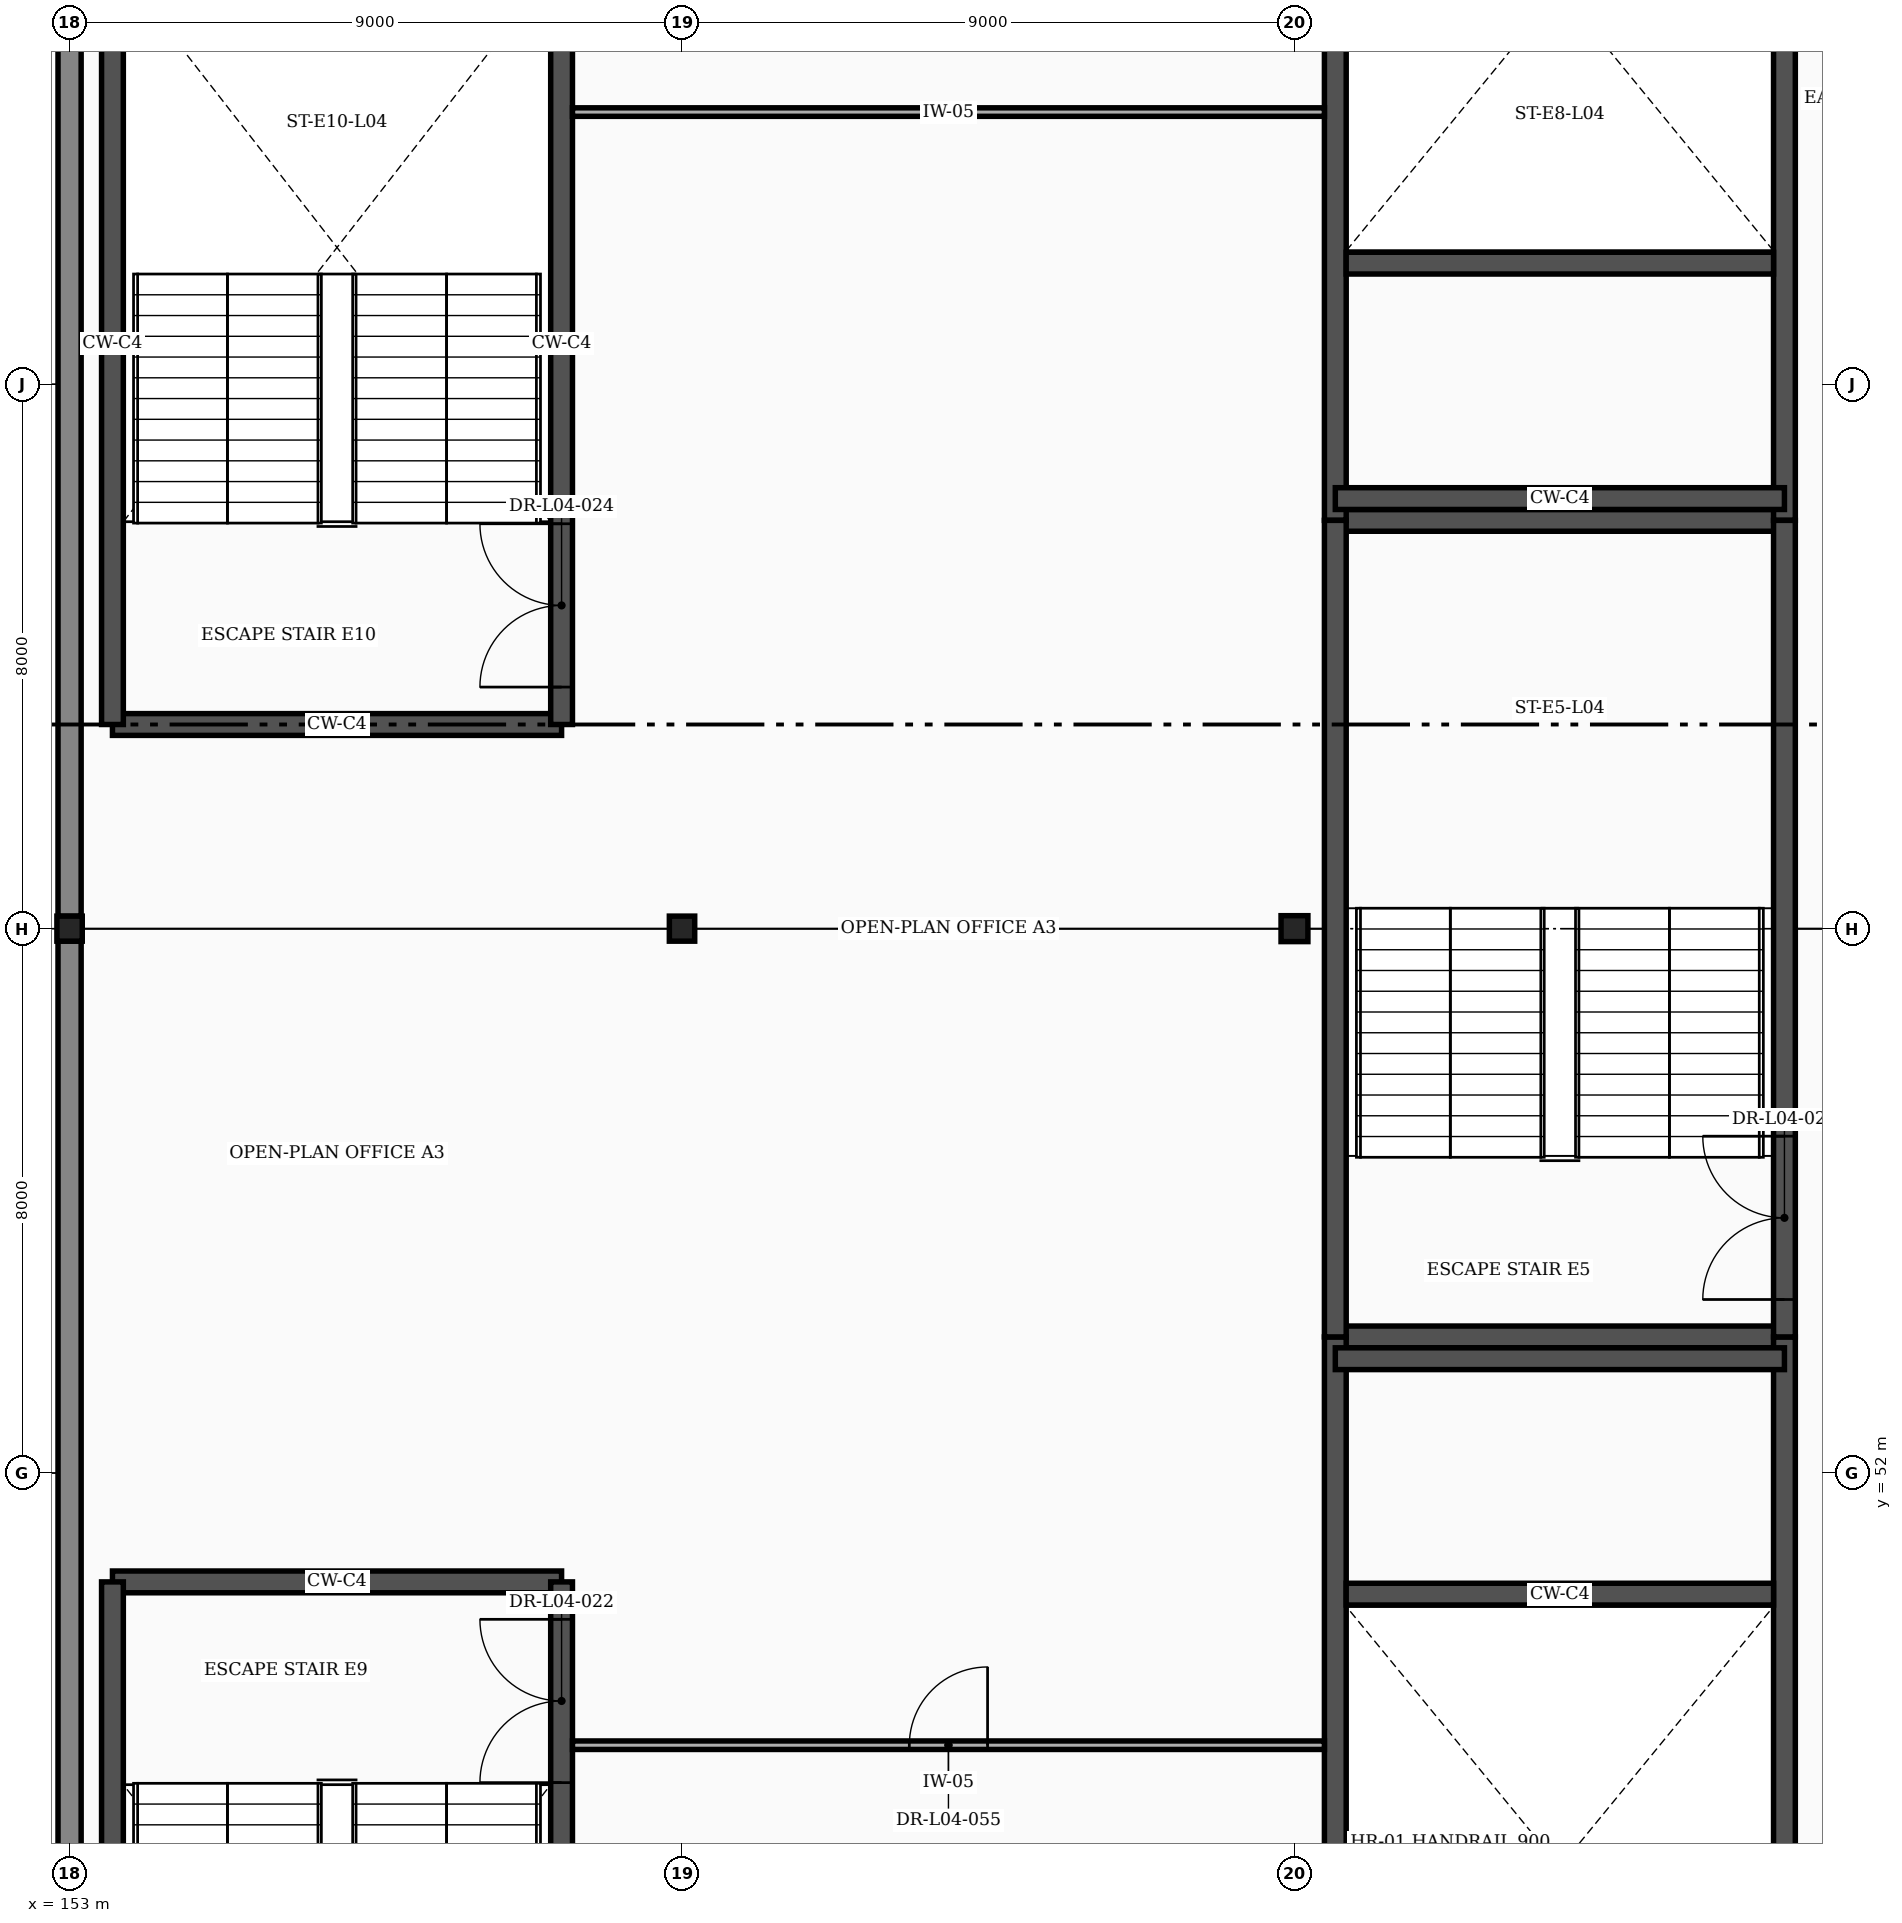
"""IFC4 building model, lengths in metres.
Left out: names, types, materials, properties, quantities, classifications, styles, units other than length and angle.
Written with IfcOpenShell. Run it as: python <this file> out.ifc"""

import sys

from ifc_helpers import new_model, si_unit, direction, frame, frame_2d, origin, origin_2d, place, context, subcontext, project, spatial, rectangle, i_section, extrude, element, fill, save


model = new_model("IFC4")
c1 = context("Model", 3, precision=1e-05, world=origin(), true_north=direction((0.0, 1.0)))
c2 = subcontext(c1, "Body", "Model", "MODEL_VIEW")
j1 = project(units=[si_unit("LENGTHUNIT", "METRE"), si_unit("PLANEANGLEUNIT", "RADIAN")], contexts=[c1])
p1 = place(None, origin())
s1 = spatial("IfcSite", under=j1, at=p1, CompositionType="ELEMENT")
p2 = place(p1, origin())
s2 = spatial("IfcBuilding", under=s1, at=p2, CompositionType="ELEMENT")
p3 = place(p2, frame((0.0, 0.0, 21.6)))
s3 = spatial("IfcBuildingStorey", under=s2, at=p3, CompositionType="ELEMENT", Elevation=21.6)
p4 = place(p3, frame((153.0, 60.0, 0.0), z_axis=(0.0, 0.0, 1.0), x_axis=(1.0, 0.0, 0.0)))
e1 = element("IfcColumn", 1, at=p4, inside=s3, PredefinedType="COLUMN", context=c2, shape_type="SweptSolid", body=[
    extrude(i_section(OverallWidth=0.373, OverallDepth=0.368, WebThickness=0.014, FlangeThickness=0.024, FilletRadius=0.015, at=origin_2d()), origin(), (0.0, 0.0, 1.0), 3.9),
])
p5 = place(p3, frame((171.0, 60.0, 0.0), z_axis=(0.0, 0.0, 1.0), x_axis=(1.0, 0.0, 0.0)))
e2 = element("IfcColumn", 2, at=p5, inside=s3, PredefinedType="COLUMN", context=c2, shape_type="SweptSolid", body=[
    extrude(i_section(OverallWidth=0.395, OverallDepth=0.381, WebThickness=0.018, FlangeThickness=0.03, at=origin_2d()), origin(), (0.0, 0.0, 1.0), 3.9),
])
p6 = place(p3, frame((162.0, 60.0, 0.0), z_axis=(0.0, 0.0, 1.0), x_axis=(1.0, 0.0, 0.0)))
e3 = element("IfcColumn", 3, at=p6, inside=s3, PredefinedType="COLUMN", context=c2, shape_type="SweptSolid", body=[
    extrude(i_section(OverallWidth=0.373, OverallDepth=0.368, WebThickness=0.014, FlangeThickness=0.024, FilletRadius=0.015, at=origin_2d()), origin(), (0.0, 0.0, 1.0), 3.9),
])
for number, where, z_axis, x_axis in (
    (4, (153.0, 36.182, 0.0), (0.0, 0.0, 1.0), (0.0, 1.0, 0.0)),
    (5, (153.0, 60.182, 0.0), (0.0, 0.0, 1.0), (0.0, 1.0, 0.0)),
):
    element("IfcWall", number, at=place(p3, frame(where, z_axis=z_axis, x_axis=x_axis)), inside=s3, PredefinedType="STANDARD", context=c2, shape_type="SweptSolid", body=[
        extrude(rectangle(XDim=23.636, YDim=0.34, at=frame_2d((11.818, 0.0))), origin(), (0.0, 0.0, 1.0), 2.973),
    ])
p7 = place(p3, frame((171.6, 54.0, 0.0), z_axis=(0.0, 0.0, 1.0), x_axis=(1.0, 0.0, 0.0)))
e6 = element("IfcWall", 6, at=p7, inside=s3, PredefinedType="SHEAR", context=c2, shape_type="SweptSolid", body=[
    extrude(rectangle(XDim=6.6, YDim=0.32, at=frame_2d((3.3, 0.0))), origin(), (0.0, 0.0, 1.0), 3.585),
])
p8 = place(p3, frame((171.6, 39.4, 0.0), z_axis=(0.0, 0.0, 1.0), x_axis=(0.0, 1.0, 0.0)))
e7 = element("IfcWall", 7, at=p8, inside=s3, PredefinedType="SHEAR", context=c2, shape_type="SweptSolid", body=[
    extrude(rectangle(XDim=14.6, YDim=0.32, at=frame_2d((7.3, 0.0))), origin(), (0.0, 0.0, 1.0), 3.585),
])
p9 = place(p3, frame((178.2, 39.4, 0.0), z_axis=(0.0, 0.0, 1.0), x_axis=(0.0, 1.0, 0.0)))
e8 = element("IfcWall", 8, at=p9, inside=s3, PredefinedType="SHEAR", context=c2, shape_type="SweptSolid", body=[
    extrude(rectangle(XDim=14.6, YDim=0.32, at=frame_2d((7.3, 0.0))), origin(), (0.0, 0.0, 1.0), 3.585),
])
p10 = place(p9, frame((0.55, 0.0, 0.0)))
e9 = element("IfcOpeningElement", 9, at=p10, cuts=e8, PredefinedType="OPENING", context=c2, shape_type="SweptSolid", body=[
    extrude(rectangle(XDim=2.4, YDim=2.25, at=frame_2d((1.2, 1.125))), frame((0.0, 0.172, 0.0), z_axis=(0.0, -1.0, 0.0), x_axis=(1.0, 0.0, 0.0)), (0.0, 0.0, 1.0), 0.344),
])
p11 = place(p3, frame((171.76, 50.22, 0.0), z_axis=(0.0, 0.0, 1.0), x_axis=(1.0, 0.0, 0.0)))
e10 = element("IfcWall", 10, at=p11, inside=s3, PredefinedType="SHEAR", context=c2, shape_type="SweptSolid", body=[
    extrude(rectangle(XDim=6.28, YDim=0.32, at=frame_2d((3.14, 0.0))), origin(), (0.0, 0.0, 1.0), 3.585),
])
p12 = place(p3, frame((171.6, 66.0, 0.0), z_axis=(0.0, 0.0, 1.0), x_axis=(1.0, 0.0, 0.0)))
e11 = element("IfcWall", 11, at=p12, inside=s3, PredefinedType="SHEAR", context=c2, shape_type="SweptSolid", body=[
    extrude(rectangle(XDim=6.6, YDim=0.32, at=frame_2d((3.3, 0.0))), origin(), (0.0, 0.0, 1.0), 3.585),
])
p13 = place(p3, frame((171.6, 66.0, 0.0), z_axis=(0.0, 0.0, 1.0), x_axis=(0.0, 1.0, 0.0)))
e12 = element("IfcWall", 12, at=p13, inside=s3, PredefinedType="SHEAR", context=c2, shape_type="SweptSolid", body=[
    extrude(rectangle(XDim=14.6, YDim=0.32, at=frame_2d((7.3, 0.0))), origin(), (0.0, 0.0, 1.0), 3.585),
])
p14 = place(p3, frame((178.2, 66.0, 0.0), z_axis=(0.0, 0.0, 1.0), x_axis=(0.0, 1.0, 0.0)))
e13 = element("IfcWall", 13, at=p14, inside=s3, PredefinedType="SHEAR", context=c2, shape_type="SweptSolid", body=[
    extrude(rectangle(XDim=14.6, YDim=0.32, at=frame_2d((7.3, 0.0))), origin(), (0.0, 0.0, 1.0), 3.585),
])
p15 = place(p14, frame((11.65, 0.0, 0.0)))
e14 = element("IfcOpeningElement", 14, at=p15, cuts=e13, PredefinedType="OPENING", context=c2, shape_type="SweptSolid", body=[
    extrude(rectangle(XDim=2.4, YDim=2.25, at=frame_2d((1.2, 1.125))), frame((0.0, 0.172, 0.0), z_axis=(0.0, -1.0, 0.0), x_axis=(1.0, 0.0, 0.0)), (0.0, 0.0, 1.0), 0.344),
])
p16 = place(p3, frame((171.76, 69.78, 0.0), z_axis=(0.0, 0.0, 1.0), x_axis=(1.0, 0.0, 0.0)))
e15 = element("IfcWall", 15, at=p16, inside=s3, PredefinedType="SHEAR", context=c2, shape_type="SweptSolid", body=[
    extrude(rectangle(XDim=6.28, YDim=0.32, at=frame_2d((3.14, 0.0))), origin(), (0.0, 0.0, 1.0), 3.585),
])
p17 = place(p3, frame((153.63, 50.4, 0.0), z_axis=(0.0, 0.0, 1.0), x_axis=(1.0, 0.0, 0.0)))
e16 = element("IfcWall", 16, at=p17, inside=s3, PredefinedType="SHEAR", context=c2, shape_type="SweptSolid", body=[
    extrude(rectangle(XDim=6.6, YDim=0.32, at=frame_2d((3.3, 0.0))), origin(), (0.0, 0.0, 1.0), 3.585),
])
p18 = place(p3, frame((153.63, 39.2, 0.0), z_axis=(0.0, 0.0, 1.0), x_axis=(0.0, 1.0, 0.0)))
e17 = element("IfcWall", 17, at=p18, inside=s3, PredefinedType="SHEAR", context=c2, shape_type="SweptSolid", body=[
    extrude(rectangle(XDim=11.2, YDim=0.32, at=frame_2d((5.6, 0.0))), origin(), (0.0, 0.0, 1.0), 3.585),
])
p19 = place(p3, frame((160.23, 39.2, 0.0), z_axis=(0.0, 0.0, 1.0), x_axis=(0.0, 1.0, 0.0)))
e18 = element("IfcWall", 18, at=p19, inside=s3, PredefinedType="SHEAR", context=c2, shape_type="SweptSolid", body=[
    extrude(rectangle(XDim=11.2, YDim=0.32, at=frame_2d((5.6, 0.0))), origin(), (0.0, 0.0, 1.0), 3.585),
])
p20 = place(p19, frame((8.25, 0.0, 0.0)))
e19 = element("IfcOpeningElement", 19, at=p20, cuts=e18, PredefinedType="OPENING", context=c2, shape_type="SweptSolid", body=[
    extrude(rectangle(XDim=2.4, YDim=2.25, at=frame_2d((1.2, 1.125))), frame((0.0, 0.172, 0.0), z_axis=(0.0, -1.0, 0.0), x_axis=(1.0, 0.0, 0.0)), (0.0, 0.0, 1.0), 0.344),
])
p21 = place(p3, frame((153.63, 63.0, 0.0), z_axis=(0.0, 0.0, 1.0), x_axis=(1.0, 0.0, 0.0)))
e20 = element("IfcWall", 20, at=p21, inside=s3, PredefinedType="SHEAR", context=c2, shape_type="SweptSolid", body=[
    extrude(rectangle(XDim=6.6, YDim=0.32, at=frame_2d((3.3, 0.0))), origin(), (0.0, 0.0, 1.0), 3.585),
])
p22 = place(p3, frame((153.63, 63.0, 0.0), z_axis=(0.0, 0.0, 1.0), x_axis=(0.0, 1.0, 0.0)))
e21 = element("IfcWall", 21, at=p22, inside=s3, PredefinedType="SHEAR", context=c2, shape_type="SweptSolid", body=[
    extrude(rectangle(XDim=11.2, YDim=0.32, at=frame_2d((5.6, 0.0))), origin(), (0.0, 0.0, 1.0), 3.585),
])
p23 = place(p3, frame((160.23, 63.0, 0.0), z_axis=(0.0, 0.0, 1.0), x_axis=(0.0, 1.0, 0.0)))
e22 = element("IfcWall", 22, at=p23, inside=s3, PredefinedType="SHEAR", context=c2, shape_type="SweptSolid", body=[
    extrude(rectangle(XDim=11.2, YDim=0.32, at=frame_2d((5.6, 0.0))), origin(), (0.0, 0.0, 1.0), 3.585),
])
p24 = place(p23, frame((0.55, 0.0, 0.0)))
e23 = element("IfcOpeningElement", 23, at=p24, cuts=e22, PredefinedType="OPENING", context=c2, shape_type="SweptSolid", body=[
    extrude(rectangle(XDim=2.4, YDim=2.25, at=frame_2d((1.2, 1.125))), frame((0.0, 0.172, 0.0), z_axis=(0.0, -1.0, 0.0), x_axis=(1.0, 0.0, 0.0)), (0.0, 0.0, 1.0), 0.344),
])
for number, where, z_axis, x_axis in (
    (24, (171.6, 53.68, 0.0), (0.0, 0.0, 1.0), (1.0, 0.0, 0.0)),
    (25, (171.6, 66.32, 0.0), (0.0, 0.0, 1.0), (1.0, 0.0, 0.0)),
):
    element("IfcWall", number, at=place(p3, frame(where, z_axis=z_axis, x_axis=x_axis)), inside=s3, PredefinedType="SHEAR", context=c2, shape_type="SweptSolid", body=[
        extrude(rectangle(XDim=6.6, YDim=0.32, at=frame_2d((3.3, 0.0))), origin(), (0.0, 0.0, 1.0), 3.585),
    ])
p25 = place(p3, frame((171.6, 54.0, 0.0), z_axis=(0.0, 0.0, 1.0), x_axis=(0.0, 1.0, 0.0)))
e26 = element("IfcWall", 26, at=p25, inside=s3, PredefinedType="SHEAR", context=c2, shape_type="SweptSolid", body=[
    extrude(rectangle(XDim=12.0, YDim=0.32, at=frame_2d((6.0, 0.0))), origin(), (0.0, 0.0, 1.0), 3.585),
])
p26 = place(p3, frame((178.2, 54.0, 0.0), z_axis=(0.0, 0.0, 1.0), x_axis=(0.0, 1.0, 0.0)))
e27 = element("IfcWall", 27, at=p26, inside=s3, PredefinedType="SHEAR", context=c2, shape_type="SweptSolid", body=[
    extrude(rectangle(XDim=12.0, YDim=0.32, at=frame_2d((6.0, 0.0))), origin(), (0.0, 0.0, 1.0), 3.585),
])
p27 = place(p26, frame((0.55, 0.0, 0.0)))
e28 = element("IfcOpeningElement", 28, at=p27, cuts=e27, PredefinedType="OPENING", context=c2, shape_type="SweptSolid", body=[
    extrude(rectangle(XDim=2.4, YDim=2.25, at=frame_2d((1.2, 1.125))), frame((0.0, 0.172, 0.0), z_axis=(0.0, -1.0, 0.0), x_axis=(1.0, 0.0, 0.0)), (0.0, 0.0, 1.0), 0.344),
])
p28 = place(p3, frame((160.39, 48.0, 0.0), z_axis=(0.0, 0.0, 1.0), x_axis=(1.0, 0.0, 0.0)))
e29 = element("IfcWall", 29, at=p28, inside=s3, PredefinedType="PARTITIONING", context=c2, shape_type="SweptSolid", body=[
    extrude(rectangle(XDim=11.05, YDim=0.125, at=frame_2d((5.525, 0.0))), origin(), (0.0, 0.0, 1.0), 3.585),
])
p29 = place(p28, frame((4.95, 0.0, 0.0)))
e30 = element("IfcOpeningElement", 30, at=p29, cuts=e29, PredefinedType="OPENING", context=c2, shape_type="SweptSolid", body=[
    extrude(rectangle(XDim=1.15, YDim=2.15, at=frame_2d((0.575, 1.075))), frame((0.0, 0.074, 0.0), z_axis=(0.0, -1.0, 0.0), x_axis=(1.0, 0.0, 0.0)), (0.0, 0.0, 1.0), 0.149),
])
p30 = place(p3, frame((160.39, 72.0, 0.0), z_axis=(0.0, 0.0, 1.0), x_axis=(1.0, 0.0, 0.0)))
e31 = element("IfcWall", 31, at=p30, inside=s3, PredefinedType="PARTITIONING", context=c2, shape_type="SweptSolid", body=[
    extrude(rectangle(XDim=11.05, YDim=0.125, at=frame_2d((5.525, 0.0))), origin(), (0.0, 0.0, 1.0), 3.585),
])
p31 = place(p20, origin())
e32 = element("IfcDoor", 32, at=p31, inside=s3, OperationType="DOUBLE_DOOR_SINGLE_SWING", PredefinedType="DOOR", context=c2, shape_type="SweptSolid", body=[
    extrude(rectangle(XDim=2.4, YDim=2.25, at=frame_2d((1.2, 1.125))), frame((0.0, 0.025, 0.0), z_axis=(0.0, -1.0, 0.0), x_axis=(1.0, 0.0, 0.0)), (0.0, 0.0, 1.0), 0.05),
])
fill(e19, e32)
p32 = place(p24, origin())
e33 = element("IfcDoor", 33, at=p32, inside=s3, OperationType="DOUBLE_DOOR_SINGLE_SWING", PredefinedType="DOOR", context=c2, shape_type="SweptSolid", body=[
    extrude(rectangle(XDim=2.4, YDim=2.25, at=frame_2d((1.2, 1.125))), frame((0.0, 0.025, 0.0), z_axis=(0.0, -1.0, 0.0), x_axis=(1.0, 0.0, 0.0)), (0.0, 0.0, 1.0), 0.05),
])
fill(e23, e33)
p33 = place(p27, origin())
e34 = element("IfcDoor", 34, at=p33, inside=s3, OperationType="DOUBLE_DOOR_SINGLE_SWING", PredefinedType="DOOR", context=c2, shape_type="SweptSolid", body=[
    extrude(rectangle(XDim=2.4, YDim=2.25, at=frame_2d((1.2, 1.125))), frame((0.0, 0.025, 0.0), z_axis=(0.0, -1.0, 0.0), x_axis=(1.0, 0.0, 0.0)), (0.0, 0.0, 1.0), 0.05),
])
fill(e28, e34)
p34 = place(p29, origin())
e35 = element("IfcDoor", 35, at=p34, inside=s3, OperationType="SINGLE_SWING_RIGHT", PredefinedType="DOOR", context=c2, shape_type="SweptSolid", body=[
    extrude(rectangle(XDim=1.15, YDim=2.15, at=frame_2d((0.575, 1.075))), frame((0.0, 0.025, 0.0), z_axis=(0.0, -1.0, 0.0), x_axis=(1.0, 0.0, 0.0)), (0.0, 0.0, 1.0), 0.05),
])
fill(e30, e35)
save(model, sys.argv[1])
